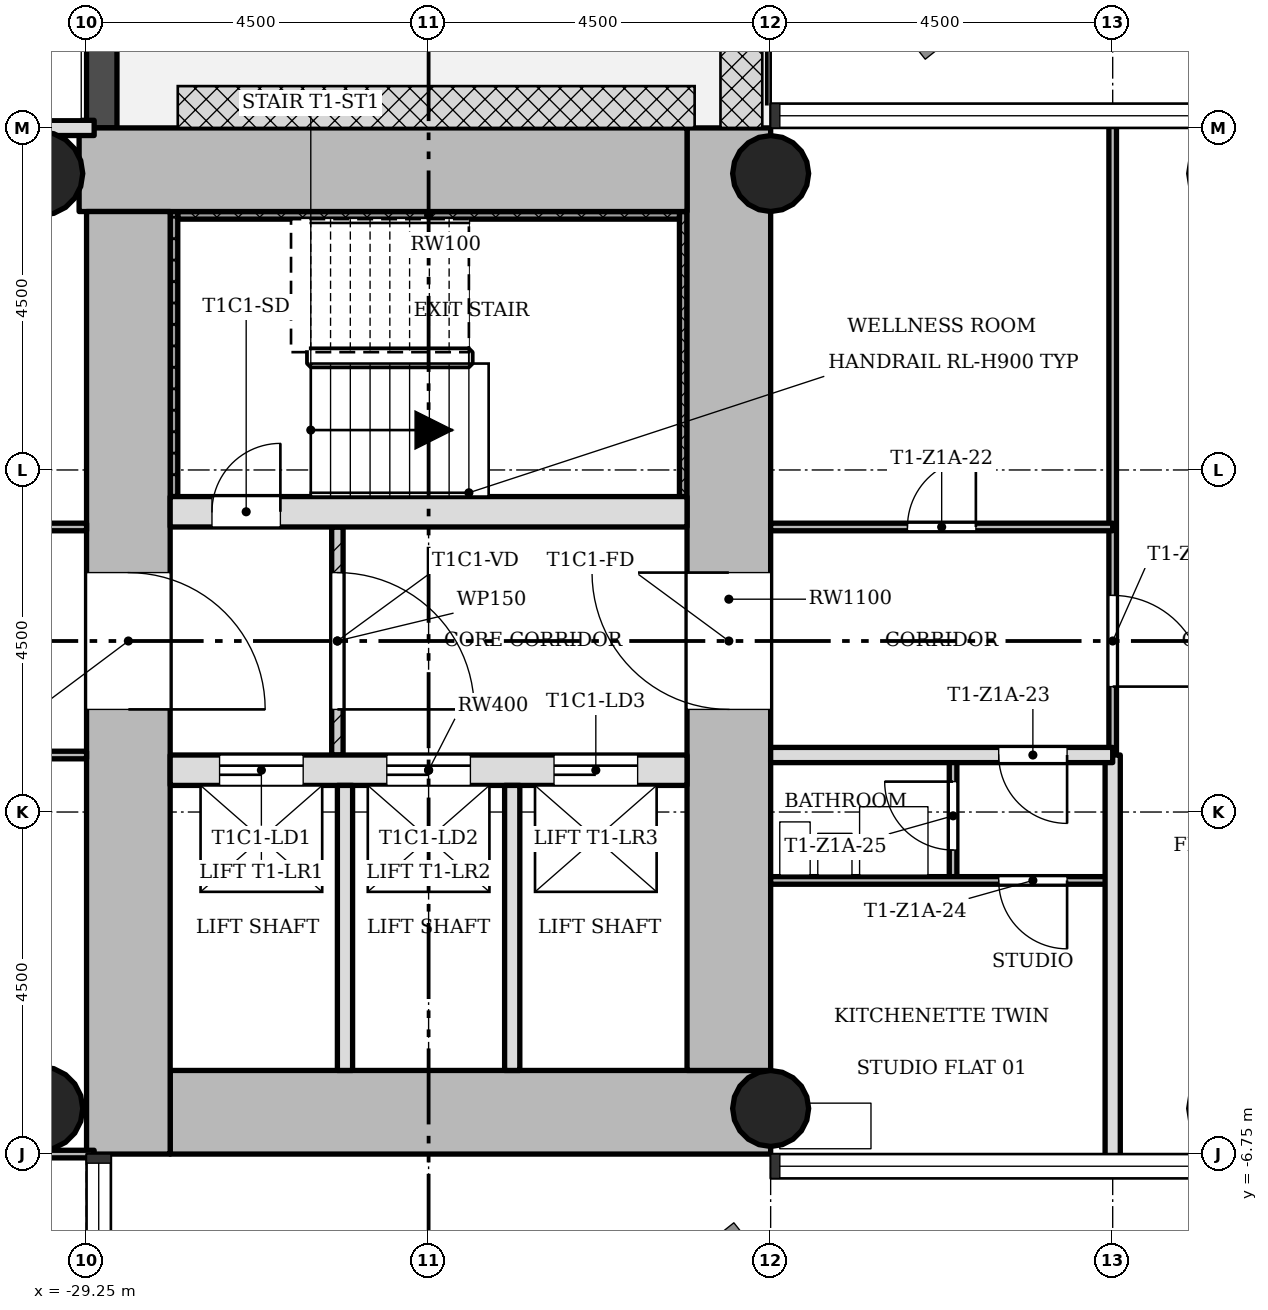
"""IFC4 building model, lengths in metres.
Left out: names, types, materials, properties, quantities, classifications, styles, units other than length and angle.
Written with IfcOpenShell. Run it as: python <this file> out.ifc"""

import sys

from ifc_helpers import new_model, si_unit, direction, frame, frame_2d, origin, origin_2d, place, context, subcontext, project, spatial, rectangle, hollow_circle, extrude, element, fill, save


model = new_model("IFC4")
c1 = context("Model", 3, precision=1e-05, world=origin(), true_north=direction((0.0, 1.0)))
c2 = subcontext(c1, "Body", "Model", "MODEL_VIEW")
j1 = project(units=[si_unit("LENGTHUNIT", "METRE"), si_unit("PLANEANGLEUNIT", "RADIAN")], contexts=[c1])
p1 = place(None, origin())
s1 = spatial("IfcSite", under=j1, at=p1, CompositionType="ELEMENT")
p2 = place(p1, origin())
s2 = spatial("IfcBuilding", under=s1, at=p2, CompositionType="ELEMENT")
p3 = place(p2, frame((0.0, 0.0, 24.5)))
s3 = spatial("IfcBuildingStorey", under=s2, at=p3, CompositionType="ELEMENT", Elevation=24.5)
p4 = place(p3, frame((-28.15, -6.2, 0.0), z_axis=(0.0, 0.0, 1.0), x_axis=(1.0, 0.0, 0.0)))
e1 = element("IfcWall", 1, at=p4, inside=s3, PredefinedType="SHEAR", context=c2, shape_type="SweptSolid", body=[
    extrude(rectangle(XDim=7.9, YDim=1.1, at=frame_2d((3.95, 0.0))), origin(), (0.0, 0.0, 1.0), 3.4),
])
p5 = place(p3, frame((-20.8, -5.65, 0.0), z_axis=(0.0, 0.0, 1.0), x_axis=(0.0, 1.0, 0.0)))
e2 = element("IfcWall", 2, at=p5, inside=s3, PredefinedType="SHEAR", context=c2, shape_type="SweptSolid", body=[
    extrude(rectangle(XDim=12.4, YDim=1.1, at=frame_2d((6.2, 0.0))), origin(), (0.0, 0.0, 1.0), 3.4),
])
p6 = place(p5, frame((4.75, 0.0, 0.0)))
e3 = element("IfcOpeningElement", 3, at=p6, cuts=e2, PredefinedType="OPENING", context=c2, shape_type="SweptSolid", body=[
    extrude(rectangle(XDim=1.8, YDim=2.1, at=frame_2d((0.9, 1.05))), frame((0.0, 0.56, 0.0), z_axis=(0.0, -1.0, 0.0), x_axis=(1.0, 0.0, 0.0)), (0.0, 0.0, 1.0), 1.12),
])
p7 = place(p3, frame((-21.35, 6.2, 0.0), z_axis=(0.0, 0.0, 1.0), x_axis=(-1.0, 0.0, 0.0)))
e4 = element("IfcWall", 4, at=p7, inside=s3, PredefinedType="SHEAR", context=c2, shape_type="SweptSolid", body=[
    extrude(rectangle(XDim=7.998, YDim=1.1, at=frame_2d((3.999, 0.0))), origin(), (0.0, 0.0, 1.0), 3.4),
])
p8 = place(p3, frame((-28.7, 5.65, 0.0), z_axis=(0.0, 0.0, 1.0), x_axis=(0.0, -1.0, 0.0)))
e5 = element("IfcWall", 5, at=p8, inside=s3, PredefinedType="SHEAR", context=c2, shape_type="SweptSolid", body=[
    extrude(rectangle(XDim=12.4, YDim=1.1, at=frame_2d((6.2, 0.0))), origin(), (0.0, 0.0, 1.0), 3.4),
])
p9 = place(p8, frame((4.75, 0.0, 0.0)))
e6 = element("IfcOpeningElement", 6, at=p9, cuts=e5, PredefinedType="OPENING", context=c2, shape_type="SweptSolid", body=[
    extrude(rectangle(XDim=1.8, YDim=2.1, at=frame_2d((0.9, 1.05))), frame((0.0, 0.56, 0.0), z_axis=(0.0, -1.0, 0.0), x_axis=(1.0, 0.0, 0.0)), (0.0, 0.0, 1.0), 1.12),
])
p10 = place(p3, frame((-28.15, -1.7, 0.0), z_axis=(0.0, 0.0, 1.0), x_axis=(1.0, 0.0, 0.0)))
e7 = element("IfcWall", 7, at=p10, inside=s3, PredefinedType="SHEAR", context=c2, shape_type="SweptSolid", body=[
    extrude(rectangle(XDim=6.8, YDim=0.4, at=frame_2d((3.4, 0.0))), origin(), (0.0, 0.0, 1.0), 3.4),
])
p11 = place(p10, frame((0.65, 0.0, 0.0)))
e8 = element("IfcOpeningElement", 8, at=p11, cuts=e7, PredefinedType="OPENING", context=c2, shape_type="SweptSolid", body=[
    extrude(rectangle(XDim=1.1, YDim=2.1, at=frame_2d((0.55, 1.05))), frame((0.0, 0.21, 0.0), z_axis=(0.0, -1.0, 0.0), x_axis=(1.0, 0.0, 0.0)), (0.0, 0.0, 1.0), 0.42),
])
p12 = place(p10, frame((2.85, 0.0, 0.0)))
e9 = element("IfcOpeningElement", 9, at=p12, cuts=e7, PredefinedType="OPENING", context=c2, shape_type="SweptSolid", body=[
    extrude(rectangle(XDim=1.1, YDim=2.1, at=frame_2d((0.55, 1.05))), frame((0.0, 0.21, 0.0), z_axis=(0.0, -1.0, 0.0), x_axis=(1.0, 0.0, 0.0)), (0.0, 0.0, 1.0), 0.42),
])
p13 = place(p10, frame((5.05, 0.0, 0.0)))
e10 = element("IfcOpeningElement", 10, at=p13, cuts=e7, PredefinedType="OPENING", context=c2, shape_type="SweptSolid", body=[
    extrude(rectangle(XDim=1.1, YDim=2.1, at=frame_2d((0.55, 1.05))), frame((0.0, 0.21, 0.0), z_axis=(0.0, -1.0, 0.0), x_axis=(1.0, 0.0, 0.0)), (0.0, 0.0, 1.0), 0.42),
])
p14 = place(p3, frame((-28.15, 1.7, 0.0), z_axis=(0.0, 0.0, 1.0), x_axis=(1.0, 0.0, 0.0)))
e11 = element("IfcWall", 11, at=p14, inside=s3, PredefinedType="SHEAR", context=c2, shape_type="SweptSolid", body=[
    extrude(rectangle(XDim=6.8, YDim=0.4, at=frame_2d((3.4, 0.0))), origin(), (0.0, 0.0, 1.0), 3.4),
])
p15 = place(p14, frame((0.55, 0.0, 0.0)))
e12 = element("IfcOpeningElement", 12, at=p15, cuts=e11, PredefinedType="OPENING", context=c2, shape_type="SweptSolid", body=[
    extrude(rectangle(XDim=0.9, YDim=2.1, at=frame_2d((0.45, 1.05))), frame((0.0, 0.21, 0.0), z_axis=(0.0, -1.0, 0.0), x_axis=(1.0, 0.0, 0.0)), (0.0, 0.0, 1.0), 0.42),
])
for number, where, z_axis, x_axis in (
    (13, (-20.25, -6.15, 0.0), (0.0, 0.0, 1.0), (1.0, 0.0, 0.0)),
    (14, (-20.25, 6.15, 0.0), (0.0, 0.0, 1.0), (1.0, 0.0, 0.0)),
):
    element("IfcColumn", number, at=place(p3, frame(where, z_axis=z_axis, x_axis=x_axis)), inside=s3, PredefinedType="COLUMN", context=c2, shape_type="SweptSolid", body=[
        extrude(hollow_circle(Radius=0.5, WallThickness=0.036, at=origin_2d()), origin(), (0.0, 0.0, 1.0), 3.4),
    ])
for number, where, z_axis, x_axis in (
    (15, (-29.85, -6.15, 0.0), (0.0, 0.0, 1.0), (1.0, 0.0, 0.0)),
    (16, (-29.85, 6.15, 0.0), (0.0, 0.0, 1.0), (1.0, 0.0, 0.0)),
):
    element("IfcColumn", number, at=place(p3, frame(where, z_axis=z_axis, x_axis=x_axis)), inside=s3, PredefinedType="COLUMN", context=c2, shape_type="SweptSolid", body=[
        extrude(hollow_circle(Radius=0.55, WallThickness=0.04, at=origin_2d()), origin(), (0.0, 0.0, 1.0), 3.4),
    ])
p16 = place(p3, frame((-29.05, 6.75, 0.0), z_axis=(0.0, 0.0, 1.0), x_axis=(0.0, 1.0, 0.0)))
e17 = element("IfcWall", 17, at=p16, inside=s3, PredefinedType="STANDARD", context=c2, shape_type="SweptSolid", body=[
    extrude(rectangle(XDim=4.5, YDim=0.4, at=frame_2d((2.25, 0.0))), origin(), (0.0, 0.0, 1.0), 3.1),
])
p17 = place(p16, frame((1.35, 0.0, 0.0)))
e18 = element("IfcOpeningElement", 18, at=p17, cuts=e17, PredefinedType="OPENING", context=c2, shape_type="SweptSolid", body=[
    extrude(rectangle(XDim=1.8, YDim=2.1, at=frame_2d((0.9, 1.05))), frame((0.0, 0.21, 0.0), z_axis=(0.0, -1.0, 0.0), x_axis=(1.0, 0.0, 0.0)), (0.0, 0.0, 1.0), 0.42),
])
p18 = place(p3, frame((-25.95, -1.5, 0.0), z_axis=(0.0, 0.0, 1.0), x_axis=(0.0, 1.0, 0.0)))
e19 = element("IfcWall", 19, at=p18, inside=s3, PredefinedType="PARTITIONING", context=c2, shape_type="SweptSolid", body=[
    extrude(rectangle(XDim=3.0, YDim=0.15, at=frame_2d((1.5, 0.0))), origin(), (0.0, 0.0, 1.0), 3.0),
])
p19 = place(p18, frame((0.6, 0.0, 0.0)))
e20 = element("IfcOpeningElement", 20, at=p19, cuts=e19, PredefinedType="OPENING", context=c2, shape_type="SweptSolid", body=[
    extrude(rectangle(XDim=1.8, YDim=2.1, at=frame_2d((0.9, 1.05))), frame((0.0, 0.085, 0.0), z_axis=(0.0, -1.0, 0.0), x_axis=(1.0, 0.0, 0.0)), (0.0, 0.0, 1.0), 0.17),
])
for number, where, z_axis, x_axis in (
    (21, (-25.85, -5.65, 0.0), (0.0, 0.0, 1.0), (0.0, 1.0, 0.0)),
    (22, (-23.65, -5.65, 0.0), (0.0, 0.0, 1.0), (0.0, 1.0, 0.0)),
):
    element("IfcWall", number, at=place(p3, frame(where, z_axis=z_axis, x_axis=x_axis)), inside=s3, PredefinedType="SOLIDWALL", context=c2, shape_type="SweptSolid", body=[
        extrude(rectangle(XDim=3.75, YDim=0.2, at=frame_2d((1.875, 0.0))), origin(), (0.0, 0.0, 1.0), 3.0),
    ])
p20 = place(p3, frame((-17.85, -3.15, 0.0), z_axis=(0.0, 0.0, 1.0), x_axis=(0.0, 1.0, 0.0)))
e23 = element("IfcWall", 23, at=p20, inside=s3, PredefinedType="PARTITIONING", context=c2, shape_type="SweptSolid", body=[
    extrude(rectangle(XDim=1.65, YDim=0.1, at=frame_2d((0.825, 0.0))), origin(), (0.0, 0.0, 1.0), 3.0),
])
p21 = place(p20, frame((0.4, 0.0, 0.0)))
e24 = element("IfcOpeningElement", 24, at=p21, cuts=e23, PredefinedType="OPENING", context=c2, shape_type="SweptSolid", body=[
    extrude(rectangle(XDim=0.9, YDim=2.1, at=frame_2d((0.45, 1.05))), frame((0.0, 0.06, 0.0), z_axis=(0.0, -1.0, 0.0), x_axis=(1.0, 0.0, 0.0)), (0.0, 0.0, 1.0), 0.12),
])
p22 = place(p3, frame((-15.75, -1.5, 0.0), z_axis=(0.0, 0.0, 1.0), x_axis=(0.0, 1.0, 0.0)))
e25 = element("IfcWall", 25, at=p22, inside=s3, PredefinedType="PARTITIONING", context=c2, shape_type="SweptSolid", body=[
    extrude(rectangle(XDim=8.35, YDim=0.1, at=frame_2d((4.175, 0.0))), origin(), (0.0, 0.0, 1.0), 3.0),
])
p23 = place(p22, frame((0.9, 0.0, 0.0)))
e26 = element("IfcOpeningElement", 26, at=p23, cuts=e25, PredefinedType="OPENING", context=c2, shape_type="SweptSolid", body=[
    extrude(rectangle(XDim=1.2, YDim=2.1, at=frame_2d((0.6, 1.05))), frame((0.0, 0.06, 0.0), z_axis=(0.0, -1.0, 0.0), x_axis=(1.0, 0.0, 0.0)), (0.0, 0.0, 1.0), 0.12),
])
p24 = place(p3, frame((-15.75, -6.85, 0.0), z_axis=(0.0, 0.0, 1.0), x_axis=(0.0, 1.0, 0.0)))
e27 = element("IfcWall", 27, at=p24, inside=s3, PredefinedType="SOLIDWALL", context=c2, shape_type="SweptSolid", body=[
    extrude(rectangle(XDim=5.35, YDim=0.2, at=frame_2d((2.675, 0.0))), origin(), (0.0, 0.0, 1.0), 3.0),
])
p25 = place(p3, frame((-35.1, -6.75, 0.0), z_axis=(0.0, 0.0, 1.0), x_axis=(1.0, 0.0, 0.0)))
e28 = element("IfcWall", 28, at=p25, inside=s3, PredefinedType="PARTITIONING", context=c2, shape_type="SweptSolid", body=[
    extrude(rectangle(XDim=5.95, YDim=0.1, at=frame_2d((2.975, 0.0))), origin(), (0.0, 0.0, 1.0), 3.0),
])
p26 = place(p3, frame((-20.25, -3.15, 0.0), z_axis=(0.0, 0.0, 1.0), x_axis=(1.0, 0.0, 0.0)))
e29 = element("IfcWall", 29, at=p26, inside=s3, PredefinedType="PARTITIONING", context=c2, shape_type="SweptSolid", body=[
    extrude(rectangle(XDim=4.5, YDim=0.1, at=frame_2d((2.25, 0.0))), origin(), (0.0, 0.0, 1.0), 3.0),
])
p27 = place(p26, frame((3.0, 0.0, 0.0)))
e30 = element("IfcOpeningElement", 30, at=p27, cuts=e29, PredefinedType="OPENING", context=c2, shape_type="SweptSolid", body=[
    extrude(rectangle(XDim=0.9, YDim=2.1, at=frame_2d((0.45, 1.05))), frame((0.0, 0.06, 0.0), z_axis=(0.0, -1.0, 0.0), x_axis=(1.0, 0.0, 0.0)), (0.0, 0.0, 1.0), 0.12),
])
p28 = place(p3, frame((-35.1, -1.5, 0.0), z_axis=(0.0, 0.0, 1.0), x_axis=(1.0, 0.0, 0.0)))
e31 = element("IfcWall", 31, at=p28, inside=s3, PredefinedType="PARTITIONING", context=c2, shape_type="SweptSolid", body=[
    extrude(rectangle(XDim=5.85, YDim=0.1, at=frame_2d((2.925, 0.0))), origin(), (0.0, 0.0, 1.0), 3.0),
])
p29 = place(p28, frame((2.475, 0.0, 0.0)))
e32 = element("IfcOpeningElement", 32, at=p29, cuts=e31, PredefinedType="OPENING", context=c2, shape_type="SweptSolid", body=[
    extrude(rectangle(XDim=0.9, YDim=2.1, at=frame_2d((0.45, 1.05))), frame((0.0, 0.06, 0.0), z_axis=(0.0, -1.0, 0.0), x_axis=(1.0, 0.0, 0.0)), (0.0, 0.0, 1.0), 0.12),
])
p30 = place(p3, frame((-20.25, -1.5, 0.0), z_axis=(0.0, 0.0, 1.0), x_axis=(1.0, 0.0, 0.0)))
e33 = element("IfcWall", 33, at=p30, inside=s3, PredefinedType="SOLIDWALL", context=c2, shape_type="SweptSolid", body=[
    extrude(rectangle(XDim=4.5, YDim=0.2, at=frame_2d((2.25, 0.0))), origin(), (0.0, 0.0, 1.0), 3.0),
])
p31 = place(p30, frame((3.0, 0.0, 0.0)))
e34 = element("IfcOpeningElement", 34, at=p31, cuts=e33, PredefinedType="OPENING", context=c2, shape_type="SweptSolid", body=[
    extrude(rectangle(XDim=0.9, YDim=2.1, at=frame_2d((0.45, 1.05))), frame((0.0, 0.11, 0.0), z_axis=(0.0, -1.0, 0.0), x_axis=(1.0, 0.0, 0.0)), (0.0, 0.0, 1.0), 0.22),
])
p32 = place(p3, frame((-35.1, 1.5, 0.0), z_axis=(0.0, 0.0, 1.0), x_axis=(1.0, 0.0, 0.0)))
e35 = element("IfcWall", 35, at=p32, inside=s3, PredefinedType="PARTITIONING", context=c2, shape_type="SweptSolid", body=[
    extrude(rectangle(XDim=5.85, YDim=0.1, at=frame_2d((2.925, 0.0))), origin(), (0.0, 0.0, 1.0), 3.0),
])
p33 = place(p32, frame((3.375, 0.0, 0.0)))
e36 = element("IfcOpeningElement", 36, at=p33, cuts=e35, PredefinedType="OPENING", context=c2, shape_type="SweptSolid", body=[
    extrude(rectangle(XDim=0.9, YDim=2.1, at=frame_2d((0.45, 1.05))), frame((0.0, 0.06, 0.0), z_axis=(0.0, -1.0, 0.0), x_axis=(1.0, 0.0, 0.0)), (0.0, 0.0, 1.0), 0.12),
])
p34 = place(p3, frame((-20.25, 1.5, 0.0), z_axis=(0.0, 0.0, 1.0), x_axis=(1.0, 0.0, 0.0)))
e37 = element("IfcWall", 37, at=p34, inside=s3, PredefinedType="PARTITIONING", context=c2, shape_type="SweptSolid", body=[
    extrude(rectangle(XDim=4.5, YDim=0.1, at=frame_2d((2.25, 0.0))), origin(), (0.0, 0.0, 1.0), 3.0),
])
p35 = place(p34, frame((1.8, 0.0, 0.0)))
e38 = element("IfcOpeningElement", 38, at=p35, cuts=e37, PredefinedType="OPENING", context=c2, shape_type="SweptSolid", body=[
    extrude(rectangle(XDim=0.9, YDim=2.1, at=frame_2d((0.45, 1.05))), frame((0.0, 0.06, 0.0), z_axis=(0.0, -1.0, 0.0), x_axis=(1.0, 0.0, 0.0)), (0.0, 0.0, 1.0), 0.12),
])
p36 = place(p3, frame((-42.85, 6.75, 0.0), z_axis=(0.0, 0.0, 1.0), x_axis=(1.0, 0.0, 0.0)))
e39 = element("IfcWall", 39, at=p36, inside=s3, PredefinedType="SOLIDWALL", context=c2, shape_type="SweptSolid", body=[
    extrude(rectangle(XDim=13.7, YDim=0.2, at=frame_2d((6.85, 0.0))), origin(), (0.0, 0.0, 1.0), 3.0),
])
p37 = place(p36, frame((6.4, 0.0, 0.0)))
e40 = element("IfcOpeningElement", 40, at=p37, cuts=e39, PredefinedType="OPENING", context=c2, shape_type="SweptSolid", body=[
    extrude(rectangle(XDim=0.9, YDim=2.1, at=frame_2d((0.45, 1.05))), frame((0.0, 0.11, 0.0), z_axis=(0.0, -1.0, 0.0), x_axis=(1.0, 0.0, 0.0)), (0.0, 0.0, 1.0), 0.22),
])
p38 = place(p3, frame((-21.4, 1.9, 0.0), z_axis=(0.0, 0.0, 1.0), x_axis=(0.0, 1.0, 0.0)))
e41 = element("IfcWall", 41, at=p38, inside=s3, PredefinedType="SHEAR", context=c2, shape_type="SweptSolid", body=[
    extrude(rectangle(XDim=3.75, YDim=0.1, at=frame_2d((1.875, 0.0))), origin(), (0.0, 0.0, 1.0), 3.4),
])
p39 = place(p3, frame((-28.05, 5.6, 0.0), z_axis=(0.0, 0.0, 1.0), x_axis=(1.0, 0.0, 0.0)))
e42 = element("IfcWall", 42, at=p39, inside=s3, PredefinedType="SHEAR", context=c2, shape_type="SweptSolid", body=[
    extrude(rectangle(XDim=6.6, YDim=0.1, at=frame_2d((3.3, 0.0))), origin(), (0.0, 0.0, 1.0), 3.4),
])
p40 = place(p3, frame((-28.1, 1.9, 0.0), z_axis=(0.0, 0.0, 1.0), x_axis=(0.0, 1.0, 0.0)))
e43 = element("IfcWall", 43, at=p40, inside=s3, PredefinedType="SHEAR", context=c2, shape_type="SweptSolid", body=[
    extrude(rectangle(XDim=3.75, YDim=0.1, at=frame_2d((1.875, 0.0))), origin(), (0.0, 0.0, 1.0), 3.4),
])
p41 = place(p19, origin())
e44 = element("IfcDoor", 44, at=p41, inside=s3, OperationType="SINGLE_SWING_LEFT", PredefinedType="DOOR", context=c2, shape_type="SweptSolid", body=[
    extrude(rectangle(XDim=1.8, YDim=2.1, at=frame_2d((0.9, 1.05))), frame((0.0, 0.025, 0.0), z_axis=(0.0, -1.0, 0.0), x_axis=(1.0, 0.0, 0.0)), (0.0, 0.0, 1.0), 0.05),
])
fill(e20, e44)
p42 = place(p35, origin())
e45 = element("IfcDoor", 45, at=p42, inside=s3, OperationType="SINGLE_SWING_LEFT", PredefinedType="DOOR", context=c2, shape_type="SweptSolid", body=[
    extrude(rectangle(XDim=0.9, YDim=2.1, at=frame_2d((0.45, 1.05))), frame((0.0, 0.025, 0.0), z_axis=(0.0, -1.0, 0.0), x_axis=(1.0, 0.0, 0.0)), (0.0, 0.0, 1.0), 0.05),
])
fill(e38, e45)
p43 = place(p31, origin())
e46 = element("IfcDoor", 46, at=p43, inside=s3, OperationType="SINGLE_SWING_RIGHT", PredefinedType="DOOR", context=c2, shape_type="SweptSolid", body=[
    extrude(rectangle(XDim=0.9, YDim=2.1, at=frame_2d((0.45, 1.05))), frame((0.0, 0.025, 0.0), z_axis=(0.0, -1.0, 0.0), x_axis=(1.0, 0.0, 0.0)), (0.0, 0.0, 1.0), 0.05),
])
fill(e34, e46)
p44 = place(p27, origin())
e47 = element("IfcDoor", 47, at=p44, inside=s3, OperationType="SINGLE_SWING_RIGHT", PredefinedType="DOOR", context=c2, shape_type="SweptSolid", body=[
    extrude(rectangle(XDim=0.9, YDim=2.1, at=frame_2d((0.45, 1.05))), frame((0.0, 0.025, 0.0), z_axis=(0.0, -1.0, 0.0), x_axis=(1.0, 0.0, 0.0)), (0.0, 0.0, 1.0), 0.05),
])
fill(e30, e47)
p45 = place(p21, origin())
e48 = element("IfcDoor", 48, at=p45, inside=s3, OperationType="SINGLE_SWING_LEFT", PredefinedType="DOOR", context=c2, shape_type="SweptSolid", body=[
    extrude(rectangle(XDim=0.9, YDim=2.1, at=frame_2d((0.45, 1.05))), frame((0.0, 0.025, 0.0), z_axis=(0.0, -1.0, 0.0), x_axis=(1.0, 0.0, 0.0)), (0.0, 0.0, 1.0), 0.05),
])
fill(e24, e48)
p46 = place(p23, origin())
e49 = element("IfcDoor", 49, at=p46, inside=s3, OperationType="SINGLE_SWING_LEFT", PredefinedType="DOOR", context=c2, shape_type="SweptSolid", body=[
    extrude(rectangle(XDim=1.2, YDim=2.1, at=frame_2d((0.6, 1.05))), frame((0.0, 0.025, 0.0), z_axis=(0.0, -1.0, 0.0), x_axis=(1.0, 0.0, 0.0)), (0.0, 0.0, 1.0), 0.05),
])
fill(e26, e49)
p47 = place(p15, origin())
e50 = element("IfcDoor", 50, at=p47, inside=s3, OperationType="SINGLE_SWING_LEFT", PredefinedType="DOOR", context=c2, shape_type="SweptSolid", body=[
    extrude(rectangle(XDim=0.9, YDim=2.1, at=frame_2d((0.45, 1.05))), frame((0.0, 0.025, 0.0), z_axis=(0.0, -1.0, 0.0), x_axis=(1.0, 0.0, 0.0)), (0.0, 0.0, 1.0), 0.05),
])
fill(e12, e50)
p48 = place(p11, origin())
e51 = element("IfcDoor", 51, at=p48, inside=s3, OperationType="SLIDING_TO_LEFT", PredefinedType="DOOR", context=c2, shape_type="SweptSolid", body=[
    extrude(rectangle(XDim=1.1, YDim=2.1, at=frame_2d((0.55, 1.05))), frame((0.0, 0.025, 0.0), z_axis=(0.0, -1.0, 0.0), x_axis=(1.0, 0.0, 0.0)), (0.0, 0.0, 1.0), 0.05),
])
fill(e8, e51)
p49 = place(p12, origin())
e52 = element("IfcDoor", 52, at=p49, inside=s3, OperationType="SLIDING_TO_LEFT", PredefinedType="DOOR", context=c2, shape_type="SweptSolid", body=[
    extrude(rectangle(XDim=1.1, YDim=2.1, at=frame_2d((0.55, 1.05))), frame((0.0, 0.025, 0.0), z_axis=(0.0, -1.0, 0.0), x_axis=(1.0, 0.0, 0.0)), (0.0, 0.0, 1.0), 0.05),
])
fill(e9, e52)
p50 = place(p13, origin())
e53 = element("IfcDoor", 53, at=p50, inside=s3, OperationType="SLIDING_TO_LEFT", PredefinedType="DOOR", context=c2, shape_type="SweptSolid", body=[
    extrude(rectangle(XDim=1.1, YDim=2.1, at=frame_2d((0.55, 1.05))), frame((0.0, 0.025, 0.0), z_axis=(0.0, -1.0, 0.0), x_axis=(1.0, 0.0, 0.0)), (0.0, 0.0, 1.0), 0.05),
])
fill(e10, e53)
p51 = place(p9, origin())
e54 = element("IfcDoor", 54, at=p51, inside=s3, OperationType="SINGLE_SWING_LEFT", PredefinedType="DOOR", context=c2, shape_type="SweptSolid", body=[
    extrude(rectangle(XDim=1.8, YDim=2.1, at=frame_2d((0.9, 1.05))), frame((0.0, 0.025, 0.0), z_axis=(0.0, -1.0, 0.0), x_axis=(1.0, 0.0, 0.0)), (0.0, 0.0, 1.0), 0.05),
])
fill(e6, e54)
p52 = place(p6, origin())
e55 = element("IfcDoor", 55, at=p52, inside=s3, OperationType="SINGLE_SWING_LEFT", PredefinedType="DOOR", context=c2, shape_type="SweptSolid", body=[
    extrude(rectangle(XDim=1.8, YDim=2.1, at=frame_2d((0.9, 1.05))), frame((0.0, 0.025, 0.0), z_axis=(0.0, -1.0, 0.0), x_axis=(1.0, 0.0, 0.0)), (0.0, 0.0, 1.0), 0.05),
])
fill(e3, e55)
save(model, sys.argv[1])
